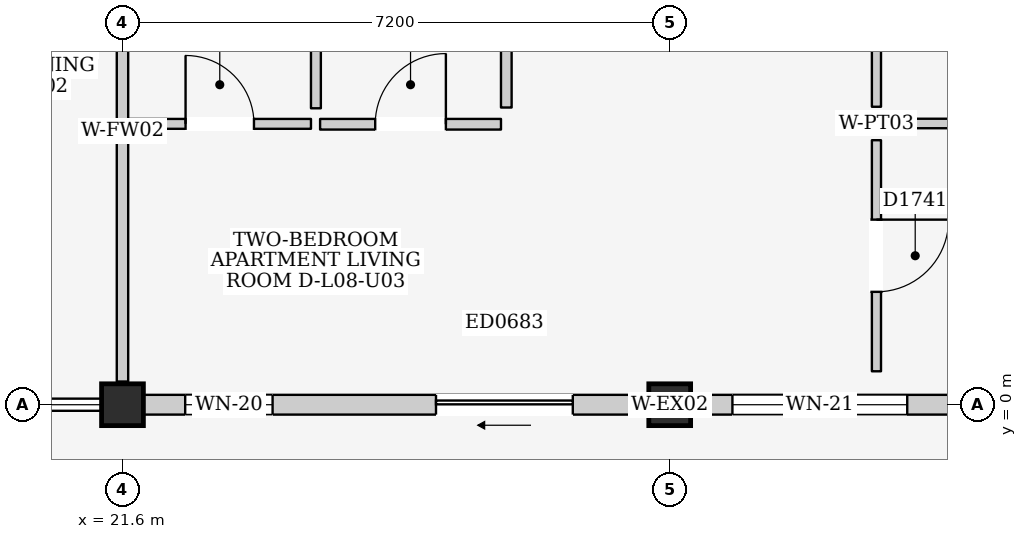
"""IFC4 building model, lengths in metres.
Left out: names, types, materials, properties, quantities, classifications, styles, units other than length and angle.
Written with IfcOpenShell. Run it as: python <this file> out.ifc"""

import sys

from ifc_helpers import new_model, si_unit, direction, frame, frame_2d, origin, origin_2d, place, context, subcontext, project, spatial, rectangle, extrude, element, fill, save


model = new_model("IFC4")
c1 = context("Model", 3, precision=1e-05, world=origin(), true_north=direction((0.0, 1.0)))
c2 = subcontext(c1, "Body", "Model", "MODEL_VIEW")
j1 = project(units=[si_unit("LENGTHUNIT", "METRE"), si_unit("PLANEANGLEUNIT", "RADIAN")], contexts=[c1])
p1 = place(None, origin())
s1 = spatial("IfcSite", under=j1, at=p1, CompositionType="ELEMENT")
p2 = place(p1, origin())
s2 = spatial("IfcBuilding", under=s1, at=p2, CompositionType="ELEMENT")
p3 = place(p2, frame((0.0, 0.0, 28.3)))
s3 = spatial("IfcBuildingStorey", under=s2, at=p3, CompositionType="ELEMENT", Elevation=28.3)
for number, where, z_axis, x_axis in (
    (1, (21.6, 0.0, 0.0), (0.0, 0.0, 1.0), (1.0, 0.0, 0.0)),
    (2, (28.8, 0.0, 0.0), (0.0, 0.0, 1.0), (1.0, 0.0, 0.0)),
):
    element("IfcColumn", number, at=place(p3, frame(where, z_axis=z_axis, x_axis=x_axis)), inside=s3, PredefinedType="COLUMN", context=c2, shape_type="SweptSolid", body=[
        extrude(rectangle(XDim=0.55, YDim=0.55, at=origin_2d()), origin(), (0.0, 0.0, 1.0), 3.2),
    ])
p4 = place(p3, frame((21.875, 0.0, 0.0), z_axis=(0.0, 0.0, 1.0), x_axis=(1.0, 0.0, 0.0)))
e3 = element("IfcWall", 3, at=p4, inside=s3, PredefinedType="ELEMENTEDWALL", context=c2, shape_type="SweptSolid", body=[
    extrude(rectangle(XDim=6.65, YDim=0.26, at=frame_2d((3.325, 0.0))), origin(), (0.0, 0.0, 1.0), 2.495),
])
p5 = place(p4, frame((3.85, 0.0, 0.0)))
e4 = element("IfcOpeningElement", 4, at=p5, cuts=e3, PredefinedType="OPENING", context=c2, shape_type="SweptSolid", body=[
    extrude(rectangle(XDim=1.8, YDim=2.12, at=frame_2d((0.9, 1.06))), frame((0.0, 0.145, 0.0), z_axis=(0.0, -1.0, 0.0), x_axis=(1.0, 0.0, 0.0)), (0.0, 0.0, 1.0), 0.29),
])
p6 = place(p4, frame((0.55, 0.0, 0.9)))
e5 = element("IfcOpeningElement", 5, at=p6, cuts=e3, PredefinedType="OPENING", context=c2, shape_type="SweptSolid", body=[
    extrude(rectangle(XDim=1.15, YDim=1.15, at=frame_2d((0.575, 0.575))), frame((0.0, 0.145, 0.0), z_axis=(0.0, -1.0, 0.0), x_axis=(1.0, 0.0, 0.0)), (0.0, 0.0, 1.0), 0.29),
])
p7 = place(p3, frame((29.075, 0.0, 0.0), z_axis=(0.0, 0.0, 1.0), x_axis=(1.0, 0.0, 0.0)))
e6 = element("IfcWall", 6, at=p7, inside=s3, PredefinedType="ELEMENTEDWALL", context=c2, shape_type="SweptSolid", body=[
    extrude(rectangle(XDim=6.65, YDim=0.26, at=frame_2d((3.325, 0.0))), origin(), (0.0, 0.0, 1.0), 2.495),
])
p8 = place(p7, frame((3.85, 0.0, 0.0)))
e7 = element("IfcOpeningElement", 7, at=p8, cuts=e6, PredefinedType="OPENING", context=c2, shape_type="SweptSolid", body=[
    extrude(rectangle(XDim=1.6, YDim=2.12, at=frame_2d((0.8, 1.06))), frame((0.0, 0.145, 0.0), z_axis=(0.0, -1.0, 0.0), x_axis=(1.0, 0.0, 0.0)), (0.0, 0.0, 1.0), 0.29),
])
p9 = place(p7, frame((0.55, 0.0, 0.78)))
e8 = element("IfcOpeningElement", 8, at=p9, cuts=e6, PredefinedType="OPENING", context=c2, shape_type="SweptSolid", body=[
    extrude(rectangle(XDim=2.3, YDim=1.6, at=frame_2d((1.15, 0.8))), frame((0.0, 0.145, 0.0), z_axis=(0.0, -1.0, 0.0), x_axis=(1.0, 0.0, 0.0)), (0.0, 0.0, 1.0), 0.29),
])
p10 = place(p3, frame((21.6, 0.305, 0.0), z_axis=(0.0, 0.0, 1.0), x_axis=(0.0, 1.0, 0.0)))
e9 = element("IfcWall", 9, at=p10, inside=s3, PredefinedType="PARTITIONING", context=c2, shape_type="SweptSolid", body=[
    extrude(rectangle(XDim=6.59, YDim=0.15, at=frame_2d((3.295, 0.0))), origin(), (0.0, 0.0, 1.0), 2.445),
])
p11 = place(p3, frame((21.68, 3.695, 0.0), z_axis=(0.0, 0.0, 1.0), x_axis=(1.0, 0.0, 0.0)))
e10 = element("IfcWall", 10, at=p11, inside=s3, PredefinedType="PARTITIONING", context=c2, shape_type="SweptSolid", body=[
    extrude(rectangle(XDim=2.4, YDim=0.13, at=frame_2d((1.2, 0.0))), origin(), (0.0, 0.0, 1.0), 2.95),
])
p12 = place(p11, frame((0.75, 0.0, 0.0)))
e11 = element("IfcOpeningElement", 11, at=p12, cuts=e10, PredefinedType="OPENING", context=c2, shape_type="SweptSolid", body=[
    extrude(rectangle(XDim=0.9, YDim=2.1, at=frame_2d((0.45, 1.05))), frame((0.0, 0.08, 0.0), z_axis=(0.0, -1.0, 0.0), x_axis=(1.0, 0.0, 0.0)), (0.0, 0.0, 1.0), 0.16),
])
p13 = place(p3, frame((24.145, 3.9, 0.0), z_axis=(0.0, 0.0, 1.0), x_axis=(0.0, 1.0, 0.0)))
e12 = element("IfcWall", 12, at=p13, inside=s3, PredefinedType="PARTITIONING", context=c2, shape_type="SweptSolid", body=[
    extrude(rectangle(XDim=3.04, YDim=0.13, at=frame_2d((1.52, 0.0))), origin(), (0.0, 0.0, 1.0), 2.95),
])
p14 = place(p3, frame((24.2, 3.69, 0.0), z_axis=(0.0, 0.0, 1.0), x_axis=(1.0, 0.0, 0.0)))
e13 = element("IfcWall", 13, at=p14, inside=s3, PredefinedType="PARTITIONING", context=c2, shape_type="SweptSolid", body=[
    extrude(rectangle(XDim=2.38, YDim=0.14, at=frame_2d((1.19, 0.0))), origin(), (0.0, 0.0, 1.0), 2.95),
])
p15 = place(p14, frame((0.725, 0.0, 0.0)))
e14 = element("IfcOpeningElement", 14, at=p15, cuts=e13, PredefinedType="OPENING", context=c2, shape_type="SweptSolid", body=[
    extrude(rectangle(XDim=0.93, YDim=2.14, at=frame_2d((0.465, 1.07))), frame((0.0, 0.085, 0.0), z_axis=(0.0, -1.0, 0.0), x_axis=(1.0, 0.0, 0.0)), (0.0, 0.0, 1.0), 0.17),
])
p16 = place(p3, frame((26.65, 3.91, 0.0), z_axis=(0.0, 0.0, 1.0), x_axis=(0.0, 1.0, 0.0)))
e15 = element("IfcWall", 15, at=p16, inside=s3, PredefinedType="PARTITIONING", context=c2, shape_type="SweptSolid", body=[
    extrude(rectangle(XDim=3.06, YDim=0.14, at=frame_2d((1.53, 0.0))), origin(), (0.0, 0.0, 1.0), 2.95),
])
p17 = place(p3, frame((31.52, 0.44, 0.0), z_axis=(0.0, 0.0, 1.0), x_axis=(0.0, 1.0, 0.0)))
e16 = element("IfcWall", 16, at=p17, inside=s3, PredefinedType="PARTITIONING", context=c2, shape_type="SweptSolid", body=[
    extrude(rectangle(XDim=3.04, YDim=0.12, at=frame_2d((1.52, 0.0))), origin(), (0.0, 0.0, 1.0), 2.95),
])
p18 = place(p17, frame((1.045, 0.0, 0.0)))
e17 = element("IfcOpeningElement", 17, at=p18, cuts=e16, PredefinedType="OPENING", context=c2, shape_type="SweptSolid", body=[
    extrude(rectangle(XDim=0.95, YDim=2.15, at=frame_2d((0.475, 1.075))), frame((0.0, 0.075, 0.0), z_axis=(0.0, -1.0, 0.0), x_axis=(1.0, 0.0, 0.0)), (0.0, 0.0, 1.0), 0.15),
])
p19 = place(p3, frame((31.72, 3.7, 0.0), z_axis=(0.0, 0.0, 1.0), x_axis=(1.0, 0.0, 0.0)))
e18 = element("IfcWall", 18, at=p19, inside=s3, PredefinedType="PARTITIONING", context=c2, shape_type="SweptSolid", body=[
    extrude(rectangle(XDim=4.06, YDim=0.125, at=frame_2d((2.03, 0.0))), origin(), (0.0, 0.0, 1.0), 2.95),
])
p20 = place(p3, frame((31.52, 3.92, 0.0), z_axis=(0.0, 0.0, 1.0), x_axis=(0.0, 1.0, 0.0)))
e19 = element("IfcWall", 19, at=p20, inside=s3, PredefinedType="PARTITIONING", context=c2, shape_type="SweptSolid", body=[
    extrude(rectangle(XDim=3.04, YDim=0.12, at=frame_2d((1.52, 0.0))), origin(), (0.0, 0.0, 1.0), 2.95),
])
p21 = place(p20, frame((1.04, 0.0, 0.0)))
e20 = element("IfcOpeningElement", 20, at=p21, cuts=e19, PredefinedType="OPENING", context=c2, shape_type="SweptSolid", body=[
    extrude(rectangle(XDim=0.96, YDim=2.15, at=frame_2d((0.48, 1.075))), frame((0.0, 0.075, 0.0), z_axis=(0.0, -1.0, 0.0), x_axis=(1.0, 0.0, 0.0)), (0.0, 0.0, 1.0), 0.15),
])
p22 = place(p5, frame((1.8, 0.0, 0.0), z_axis=(0.0, 0.0, 1.0), x_axis=(-1.0, 0.0, 0.0)))
e21 = element("IfcDoor", 21, at=p22, inside=s3, OperationType="SLIDING_TO_LEFT", PredefinedType="DOOR", context=c2, shape_type="SweptSolid", body=[
    extrude(rectangle(XDim=1.8, YDim=2.12, at=frame_2d((0.9, 1.06))), frame((0.0, 0.025, 0.0), z_axis=(0.0, -1.0, 0.0), x_axis=(1.0, 0.0, 0.0)), (0.0, 0.0, 1.0), 0.05),
])
fill(e4, e21)
p23 = place(p6, origin())
e22 = element("IfcWindow", 22, at=p23, inside=s3, PartitioningType="SINGLE_PANEL", PredefinedType="WINDOW", context=c2, shape_type="SweptSolid", body=[
    extrude(rectangle(XDim=1.15, YDim=1.15, at=frame_2d((0.575, 0.575))), frame((0.0, 0.03, 0.0), z_axis=(0.0, -1.0, 0.0), x_axis=(1.0, 0.0, 0.0)), (0.0, 0.0, 1.0), 0.06),
])
fill(e5, e22)
p24 = place(p9, origin())
e23 = element("IfcWindow", 23, at=p24, inside=s3, PartitioningType="TRIPLE_PANEL_VERTICAL", PredefinedType="WINDOW", context=c2, shape_type="SweptSolid", body=[
    extrude(rectangle(XDim=2.3, YDim=1.6, at=frame_2d((1.15, 0.8))), frame((0.0, 0.03, 0.0), z_axis=(0.0, -1.0, 0.0), x_axis=(1.0, 0.0, 0.0)), (0.0, 0.0, 1.0), 0.06),
])
fill(e8, e23)
p25 = place(p12, origin())
e24 = element("IfcDoor", 24, at=p25, inside=s3, OperationType="SINGLE_SWING_LEFT", PredefinedType="DOOR", context=c2, shape_type="SweptSolid", body=[
    extrude(rectangle(XDim=0.9, YDim=2.1, at=frame_2d((0.45, 1.05))), frame((0.0, 0.025, 0.0), z_axis=(0.0, -1.0, 0.0), x_axis=(1.0, 0.0, 0.0)), (0.0, 0.0, 1.0), 0.05),
])
fill(e11, e24)
p26 = place(p15, origin())
e25 = element("IfcDoor", 25, at=p26, inside=s3, OperationType="SINGLE_SWING_RIGHT", PredefinedType="DOOR", context=c2, shape_type="SweptSolid", body=[
    extrude(rectangle(XDim=0.93, YDim=2.14, at=frame_2d((0.465, 1.07))), frame((0.0, 0.025, 0.0), z_axis=(0.0, -1.0, 0.0), x_axis=(1.0, 0.0, 0.0)), (0.0, 0.0, 1.0), 0.05),
])
fill(e14, e25)
p27 = place(p18, frame((0.95, 0.0, 0.0), z_axis=(0.0, 0.0, 1.0), x_axis=(-1.0, 0.0, 0.0)))
e26 = element("IfcDoor", 26, at=p27, inside=s3, OperationType="SINGLE_SWING_LEFT", PredefinedType="DOOR", context=c2, shape_type="SweptSolid", body=[
    extrude(rectangle(XDim=0.95, YDim=2.15, at=frame_2d((0.475, 1.075))), frame((0.0, 0.025, 0.0), z_axis=(0.0, -1.0, 0.0), x_axis=(1.0, 0.0, 0.0)), (0.0, 0.0, 1.0), 0.05),
])
fill(e17, e26)
save(model, sys.argv[1])
